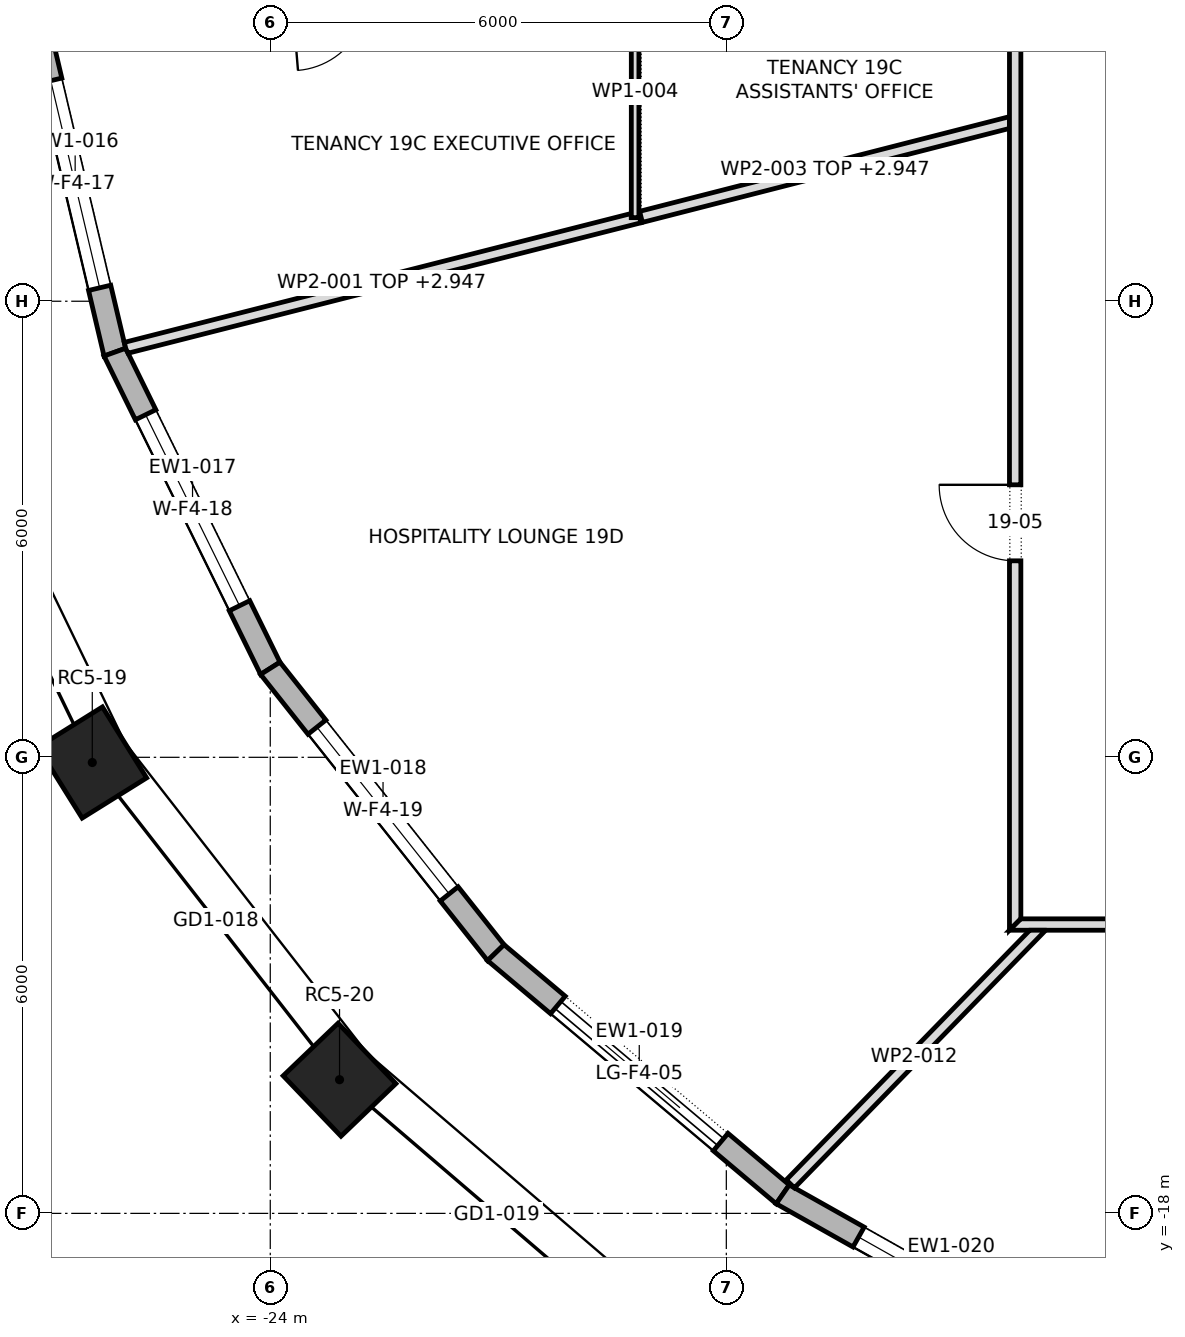
"""IFC4 building model, lengths in metres.
Left out: names, types, materials, properties, quantities, classifications, styles, units other than length and angle.
Written with IfcOpenShell. Run it as: python <this file> out.ifc"""

import sys

from ifc_helpers import new_model, si_unit, direction, frame, frame_2d, origin, origin_2d, place, context, subcontext, project, spatial, polyline, rectangle, outline, extrude, element, fill, save


model = new_model("IFC4")
c1 = context("Model", 3, precision=1e-05, world=origin(), true_north=direction((0.0, 1.0)))
c2 = subcontext(c1, "Body", "Model", "MODEL_VIEW")
j1 = project(units=[si_unit("LENGTHUNIT", "METRE"), si_unit("PLANEANGLEUNIT", "RADIAN")], contexts=[c1])
p1 = place(None, origin())
s1 = spatial("IfcSite", under=j1, at=p1, CompositionType="ELEMENT")
p2 = place(p1, origin())
s2 = spatial("IfcBuilding", under=s1, at=p2, CompositionType="ELEMENT")
p3 = place(p2, frame((0.0, 0.0, 268.3)))
s3 = spatial("IfcBuildingStorey", under=s2, at=p3, CompositionType="ELEMENT", Elevation=268.3)
for number, where, z_axis, x_axis in (
    (1, (-26.342, -12.069, 0.0), (0.0, 0.0, 1.0), (0.529, -0.849, 0.0)),
    (2, (-23.089, -16.241, 0.0), (0.0, 0.0, 1.0), (0.692, -0.722, 0.0)),
):
    element("IfcColumn", number, at=place(p3, frame(where, z_axis=z_axis, x_axis=x_axis)), inside=s3, PredefinedType="COLUMN", context=c2, shape_type="SweptSolid", body=[
        extrude(rectangle(XDim=1.1, YDim=1.0, at=origin_2d()), origin(), (0.0, 0.0, 1.0), 4.0),
    ])
p4 = place(p3, frame((-27.088, -2.252, 0.0), z_axis=(0.0, 0.0, 1.0), x_axis=(0.22983372436, -0.973229910734, 0.0)))
e3 = element("IfcWall", 3, at=p4, inside=s3, PredefinedType="STANDARD", context=c2, shape_type="SweptSolid", body=[
    extrude(outline(polyline([(-0.018, -0.15), (4.556, -0.15), (4.522, 0.15), (0.018, 0.15), (-0.018, -0.15)])), origin(), (0.0, 0.0, 1.0), 3.7),
])
p5 = place(p4, frame((0.869, 0.0, 0.6)))
e4 = element("IfcOpeningElement", 4, at=p5, cuts=e3, PredefinedType="OPENING", context=c2, shape_type="SweptSolid", body=[
    extrude(rectangle(XDim=2.8, YDim=2.65, at=frame_2d((1.4, 1.325))), frame((0.0, 0.162, 0.0), z_axis=(0.0, -1.0, 0.0), x_axis=(1.0, 0.0, 0.0)), (0.0, 0.0, 1.0), 0.324),
])
p6 = place(p3, frame((-26.045, -6.67, 0.0), z_axis=(0.0, 0.0, 1.0), x_axis=(0.441261940724, -0.897378348117, 0.0)))
e5 = element("IfcWall", 5, at=p6, inside=s3, PredefinedType="STANDARD", context=c2, shape_type="SweptSolid", body=[
    extrude(outline(polyline([(-0.017, -0.15), (4.651, -0.15), (4.619, 0.15), (0.017, 0.15), (-0.017, -0.15)])), origin(), (0.0, 0.0, 1.0), 3.7),
])
p7 = place(p6, frame((0.917, 0.0, 0.6)))
e6 = element("IfcOpeningElement", 6, at=p7, cuts=e5, PredefinedType="OPENING", context=c2, shape_type="SweptSolid", body=[
    extrude(rectangle(XDim=2.8, YDim=2.65, at=frame_2d((1.4, 1.325))), frame((0.0, 0.162, 0.0), z_axis=(0.0, -1.0, 0.0), x_axis=(1.0, 0.0, 0.0)), (0.0, 0.0, 1.0), 0.324),
])
p8 = place(p3, frame((-24.0, -10.829, 0.0), z_axis=(0.0, 0.0, 1.0), x_axis=(0.621434755851, -0.783465917715, 0.0)))
e7 = element("IfcWall", 7, at=p8, inside=s3, PredefinedType="STANDARD", context=c2, shape_type="SweptSolid", body=[
    extrude(outline(polyline([(-0.016, -0.15), (4.79, -0.15), (4.76, 0.15), (0.016, 0.15), (-0.016, -0.15)])), origin(), (0.0, 0.0, 1.0), 3.7),
])
p9 = place(p8, frame((0.987, 0.0, 0.6)))
e8 = element("IfcOpeningElement", 8, at=p9, cuts=e7, PredefinedType="OPENING", context=c2, shape_type="SweptSolid", body=[
    extrude(rectangle(XDim=2.8, YDim=2.65, at=frame_2d((1.4, 1.325))), frame((0.0, 0.162, 0.0), z_axis=(0.0, -1.0, 0.0), x_axis=(1.0, 0.0, 0.0)), (0.0, 0.0, 1.0), 0.324),
])
p10 = place(p3, frame((-21.032, -14.57, 0.0), z_axis=(0.0, 0.0, 1.0), x_axis=(0.764832940795, -0.644228664897, 0.0)))
e9 = element("IfcWall", 9, at=p10, inside=s3, PredefinedType="STANDARD", context=c2, shape_type="SweptSolid", body=[
    extrude(outline(polyline([(-0.015, -0.15), (4.949, -0.15), (4.921, 0.15), (0.015, 0.15), (-0.015, -0.15)])), origin(), (0.0, 0.0, 1.0), 3.7),
])
p11 = place(p10, frame((1.068, 0.0, 0.0)))
e10 = element("IfcOpeningElement", 10, at=p11, cuts=e9, PredefinedType="OPENING", context=c2, shape_type="SweptSolid", body=[
    extrude(rectangle(XDim=2.8, YDim=3.25, at=frame_2d((1.4, 1.625))), frame((0.0, 0.162, 0.0), z_axis=(0.0, -1.0, 0.0), x_axis=(1.0, 0.0, 0.0)), (0.0, 0.0, 1.0), 0.324),
])
p12 = place(p3, frame((-17.258, -17.75, 0.0), z_axis=(0.0, 0.0, 1.0), x_axis=(0.871433320402, -0.490513983585, 0.0)))
e11 = element("IfcWall", 11, at=p12, inside=s3, PredefinedType="STANDARD", context=c2, shape_type="SweptSolid", body=[
    extrude(outline(polyline([(-0.014, -0.15), (5.104, -0.15), (5.077, 0.15), (0.014, 0.15), (-0.014, -0.15)])), origin(), (0.0, 0.0, 1.0), 3.7),
])
p13 = place(p12, frame((1.145, 0.0, 0.6)))
e12 = element("IfcOpeningElement", 12, at=p13, cuts=e11, PredefinedType="OPENING", context=c2, shape_type="SweptSolid", body=[
    extrude(rectangle(XDim=2.8, YDim=2.65, at=frame_2d((1.4, 1.325))), frame((0.0, 0.162, 0.0), z_axis=(0.0, -1.0, 0.0), x_axis=(1.0, 0.0, 0.0)), (0.0, 0.0, 1.0), 0.324),
])
p14 = place(p3, frame((-25.902, -6.614, 0.0), z_axis=(0.0, 0.0, 1.0), x_axis=(0.969153959709, 0.246456086108, 0.0)))
e13 = element("IfcWall", 13, at=p14, inside=s3, PredefinedType="PARTITIONING", context=c2, shape_type="SweptSolid", body=[
    extrude(outline(polyline([(0.013, -0.075), (1.756, -0.075), (3.5, -0.075), (5.243, -0.075), (6.986, -0.075), (6.986, 0.072), (6.967, -0.003), (6.87, 0.022), (6.883, 0.075), (5.162, 0.075), (3.442, 0.075), (1.721, 0.075), (0.0, 0.075), (0.0, -0.012), (0.013, -0.075)])), origin(), (0.0, 0.0, 1.0), 2.947),
])
p15 = place(p3, frame((-19.132, -4.893, 0.0), z_axis=(0.0, 0.0, 1.0), x_axis=(0.968763144659, 0.247987841537, 0.0)))
e14 = element("IfcWall", 14, at=p15, inside=s3, PredefinedType="PARTITIONING", context=c2, shape_type="SweptSolid", body=[
    extrude(outline(polyline([(0.0, -0.075), (1.665, -0.075), (3.33, -0.075), (4.994, -0.075), (5.033, 0.074), (5.033, 0.075), (3.355, 0.075), (1.678, 0.075), (0.001, 0.075), (0.0, 0.072), (0.0, -0.075)])), origin(), (0.0, 0.0, 1.0), 2.947),
])
p16 = place(p3, frame((-19.2, -4.9, 0.0), z_axis=(0.0, 0.0, 1.0), x_axis=(0.0, 1.0, 0.0)))
e15 = element("IfcWall", 15, at=p16, inside=s3, PredefinedType="PARTITIONING", context=c2, shape_type="SweptSolid", body=[
    extrude(rectangle(XDim=3.31, YDim=0.1, at=frame_2d((1.655, 0.0))), origin(), (0.0, 0.0, 1.0), 3.7),
])
p17 = place(p3, frame((-14.2, -14.275, 0.0), z_axis=(0.0, 0.0, 1.0), x_axis=(0.0, 1.0, 0.0)))
e16 = element("IfcWall", 16, at=p17, inside=s3, PredefinedType="PARTITIONING", context=c2, shape_type="SweptSolid", body=[
    extrude(outline(polyline([(0.15, -0.075), (2.033, -0.075), (3.917, -0.075), (5.8, -0.075), (7.683, -0.075), (9.567, -0.075), (11.45, -0.075), (13.333, -0.075), (15.217, -0.075), (17.1, -0.075), (18.983, -0.075), (20.866, -0.075), (22.75, -0.075), (24.633, -0.075), (26.517, -0.075), (28.4, -0.075), (28.55, 0.075), (28.55, 0.075), (26.646, 0.075), (24.743, 0.075), (22.84, 0.075), (20.937, 0.075), (19.033, 0.075), (17.13, 0.075), (15.227, 0.075), (13.323, 0.075), (11.42, 0.075), (9.517, 0.075), (7.613, 0.075), (5.71, 0.075), (3.807, 0.075), (1.903, 0.075), (0.0, 0.075), (0.15, -0.075)])), origin(), (0.0, 0.0, 1.0), 3.7),
])
p18 = place(p17, frame((20.5, 0.0, 0.0)))
e17 = element("IfcOpeningElement", 17, at=p18, cuts=e16, PredefinedType="OPENING", context=c2, shape_type="SweptSolid", body=[
    extrude(rectangle(XDim=1.0, YDim=2.1, at=frame_2d((0.5, 1.05))), frame((0.0, 0.087, 0.0), z_axis=(0.0, -1.0, 0.0), x_axis=(1.0, 0.0, 0.0)), (0.0, 0.0, 1.0), 0.174),
])
p19 = place(p17, frame((11.595, 0.0, 0.0)))
e18 = element("IfcOpeningElement", 18, at=p19, cuts=e16, PredefinedType="OPENING", context=c2, shape_type="SweptSolid", body=[
    extrude(rectangle(XDim=1.0, YDim=2.1, at=frame_2d((0.5, 1.05))), frame((0.0, 0.087, 0.0), z_axis=(0.0, -1.0, 0.0), x_axis=(1.0, 0.0, 0.0)), (0.0, 0.0, 1.0), 0.174),
])
p20 = place(p17, frame((15.225, 0.0, 0.0)))
e19 = element("IfcOpeningElement", 19, at=p20, cuts=e16, PredefinedType="OPENING", context=c2, shape_type="SweptSolid", body=[
    extrude(rectangle(XDim=1.0, YDim=2.1, at=frame_2d((0.5, 1.05))), frame((0.0, 0.087, 0.0), z_axis=(0.0, -1.0, 0.0), x_axis=(1.0, 0.0, 0.0)), (0.0, 0.0, 1.0), 0.174),
])
p21 = place(p17, frame((4.86, 0.0, 0.0)))
e20 = element("IfcOpeningElement", 20, at=p21, cuts=e16, PredefinedType="OPENING", context=c2, shape_type="SweptSolid", body=[
    extrude(rectangle(XDim=1.0, YDim=2.1, at=frame_2d((0.5, 1.05))), frame((0.0, 0.087, 0.0), z_axis=(0.0, -1.0, 0.0), x_axis=(1.0, 0.0, 0.0)), (0.0, 0.0, 1.0), 0.174),
])
p22 = place(p3, frame((-14.275, -14.2, 0.0), z_axis=(0.0, 0.0, 1.0), x_axis=(1.0, 0.0, 0.0)))
e21 = element("IfcWall", 21, at=p22, inside=s3, PredefinedType="PARTITIONING", context=c2, shape_type="SweptSolid", body=[
    extrude(outline(polyline([(28.55, -0.075), (28.55, -0.075), (28.4, 0.075), (26.517, 0.075), (24.633, 0.075), (22.75, 0.075), (20.866, 0.075), (18.983, 0.075), (17.1, 0.075), (15.217, 0.075), (13.333, 0.075), (11.45, 0.075), (9.567, 0.075), (7.683, 0.075), (5.8, 0.075), (3.917, 0.075), (2.033, 0.075), (0.15, 0.075), (0.0, -0.075), (1.903, -0.075), (3.807, -0.075), (5.71, -0.075), (7.613, -0.075), (9.517, -0.075), (11.42, -0.075), (13.323, -0.075), (15.227, -0.075), (17.13, -0.075), (19.033, -0.075), (20.937, -0.075), (22.84, -0.075), (24.743, -0.075), (26.646, -0.075), (28.55, -0.075)])), origin(), (0.0, 0.0, 1.0), 3.7),
])
p23 = place(p22, frame((4.305, 0.0, 0.0)))
e22 = element("IfcOpeningElement", 22, at=p23, cuts=e21, PredefinedType="OPENING", context=c2, shape_type="SweptSolid", body=[
    extrude(rectangle(XDim=1.0, YDim=2.1, at=frame_2d((0.5, 1.05))), frame((0.0, 0.087, 0.0), z_axis=(0.0, -1.0, 0.0), x_axis=(1.0, 0.0, 0.0)), (0.0, 0.0, 1.0), 0.174),
])
p24 = place(p22, frame((17.735, 0.0, 0.0)))
e23 = element("IfcOpeningElement", 23, at=p24, cuts=e21, PredefinedType="OPENING", context=c2, shape_type="SweptSolid", body=[
    extrude(rectangle(XDim=1.8, YDim=2.1, at=frame_2d((0.9, 1.05))), frame((0.0, 0.087, 0.0), z_axis=(0.0, -1.0, 0.0), x_axis=(1.0, 0.0, 0.0)), (0.0, 0.0, 1.0), 0.174),
])
p25 = place(p3, frame((-13.852, -14.223, 0.0), z_axis=(0.0, 0.0, 1.0), x_axis=(-0.69820654799, -0.715896372629, 0.0)))
e24 = element("IfcWall", 24, at=p25, inside=s3, PredefinedType="PARTITIONING", context=c2, shape_type="SweptSolid", body=[
    extrude(outline(polyline([(4.734, -0.075), (4.734, 0.075), (4.734, 0.075), (3.156, 0.075), (1.578, 0.075), (0.0, 0.075), (0.0, 0.075), (0.146, -0.075), (1.675, -0.075), (3.205, -0.075), (4.734, -0.075)])), origin(), (0.0, 0.0, 1.0), 3.7),
])
p26 = place(p5, origin())
e25 = element("IfcWindow", 25, at=p26, inside=s3, PartitioningType="DOUBLE_PANEL_VERTICAL", PredefinedType="WINDOW", context=c2, shape_type="SweptSolid", body=[
    extrude(rectangle(XDim=2.8, YDim=2.65, at=frame_2d((1.4, 1.325))), frame((0.0, 0.03, 0.0), z_axis=(0.0, -1.0, 0.0), x_axis=(1.0, 0.0, 0.0)), (0.0, 0.0, 1.0), 0.06),
])
fill(e4, e25)
p27 = place(p7, origin())
e26 = element("IfcWindow", 26, at=p27, inside=s3, PartitioningType="DOUBLE_PANEL_VERTICAL", PredefinedType="WINDOW", context=c2, shape_type="SweptSolid", body=[
    extrude(rectangle(XDim=2.8, YDim=2.65, at=frame_2d((1.4, 1.325))), frame((0.0, 0.03, 0.0), z_axis=(0.0, -1.0, 0.0), x_axis=(1.0, 0.0, 0.0)), (0.0, 0.0, 1.0), 0.06),
])
fill(e6, e26)
p28 = place(p9, origin())
e27 = element("IfcWindow", 27, at=p28, inside=s3, PartitioningType="DOUBLE_PANEL_VERTICAL", PredefinedType="WINDOW", context=c2, shape_type="SweptSolid", body=[
    extrude(rectangle(XDim=2.8, YDim=2.65, at=frame_2d((1.4, 1.325))), frame((0.0, 0.03, 0.0), z_axis=(0.0, -1.0, 0.0), x_axis=(1.0, 0.0, 0.0)), (0.0, 0.0, 1.0), 0.06),
])
fill(e8, e27)
p29 = place(p11, origin())
e28 = element("IfcDoor", 28, at=p29, inside=s3, OperationType="DOUBLE_DOOR_SLIDING", PredefinedType="DOOR", context=c2, shape_type="SweptSolid", body=[
    extrude(rectangle(XDim=2.8, YDim=3.25, at=frame_2d((1.4, 1.625))), frame((0.0, 0.025, 0.0), z_axis=(0.0, -1.0, 0.0), x_axis=(1.0, 0.0, 0.0)), (0.0, 0.0, 1.0), 0.05),
])
fill(e10, e28)
p30 = place(p13, origin())
e29 = element("IfcWindow", 29, at=p30, inside=s3, PartitioningType="DOUBLE_PANEL_VERTICAL", PredefinedType="WINDOW", context=c2, shape_type="SweptSolid", body=[
    extrude(rectangle(XDim=2.8, YDim=2.65, at=frame_2d((1.4, 1.325))), frame((0.0, 0.03, 0.0), z_axis=(0.0, -1.0, 0.0), x_axis=(1.0, 0.0, 0.0)), (0.0, 0.0, 1.0), 0.06),
])
fill(e12, e29)
p31 = place(p21, origin())
e30 = element("IfcDoor", 30, at=p31, inside=s3, OperationType="SINGLE_SWING_LEFT", PredefinedType="DOOR", context=c2, shape_type="SweptSolid", body=[
    extrude(rectangle(XDim=1.0, YDim=2.1, at=frame_2d((0.5, 1.05))), frame((0.0, 0.025, 0.0), z_axis=(0.0, -1.0, 0.0), x_axis=(1.0, 0.0, 0.0)), (0.0, 0.0, 1.0), 0.05),
])
fill(e20, e30)
save(model, sys.argv[1])
